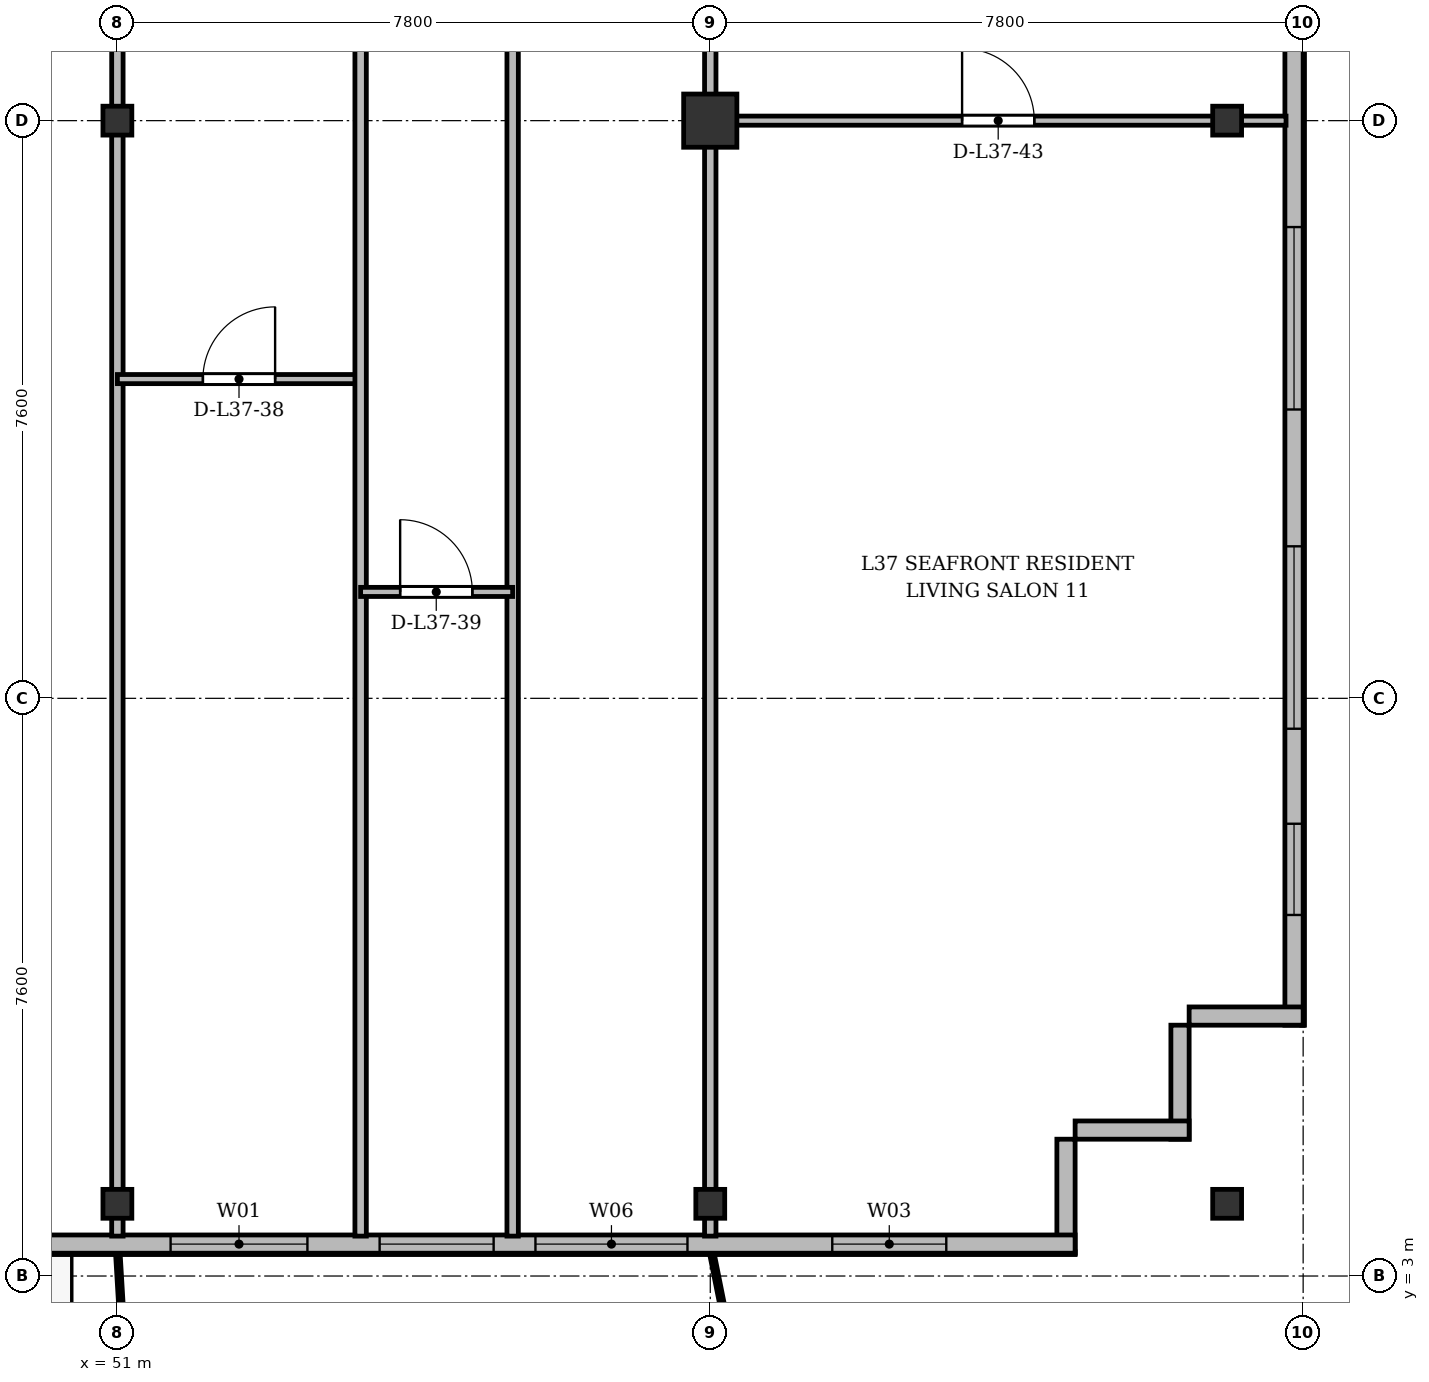
"""IFC4 building model, lengths in metres.
Left out: names, types, materials, properties, quantities, classifications, styles, units other than length and angle.
Written with IfcOpenShell. Run it as: python <this file> out.ifc"""

import sys

from ifc_helpers import new_model, si_unit, direction, frame, frame_2d, origin, origin_2d, place, context, subcontext, project, spatial, rectangle, i_section, extrude, source, transform, mapped, element, fill, save


model = new_model("IFC4")
c1 = context("Model", 3, precision=1e-05, world=origin(), true_north=direction((0.0, 1.0)))
c2 = subcontext(c1, "Body", "Model", "MODEL_VIEW")
j1 = project(units=[si_unit("LENGTHUNIT", "METRE"), si_unit("PLANEANGLEUNIT", "RADIAN")], contexts=[c1])
p1 = place(None, origin())
s1 = spatial("IfcSite", under=j1, at=p1, CompositionType="ELEMENT")
p2 = place(p1, origin())
s2 = spatial("IfcBuilding", under=s1, at=p2, CompositionType="ELEMENT")
p3 = place(p2, frame((0.0, 0.0, 142.9)))
s3 = spatial("IfcBuildingStorey", under=s2, at=p3, CompositionType="ELEMENT", Elevation=142.9)
m1 = source(origin(), c2, "Body", "SweptSolid", [
    extrude(i_section(OverallWidth=0.38, OverallDepth=0.38, WebThickness=0.02, FlangeThickness=0.03, at=origin_2d()), origin(), (0.0, 0.0, 1.0), 3.6),
])
for number, where, z_axis, x_axis in (
    (1, (51.0, 3.95, 0.0), (0.0, 0.0, 1.0), (1.0, 0.0, 0.0)),
    (2, (51.0, 18.2, 0.0), (0.0, 0.0, 1.0), (1.0, 0.0, 0.0)),
    (3, (58.8, 3.95, 0.0), (0.0, 0.0, 1.0), (1.0, 0.0, 0.0)),
):
    element("IfcColumn", number, at=place(p3, frame(where, z_axis=z_axis, x_axis=x_axis)), inside=s3, PredefinedType="COLUMN", context=c2, shape_type="MappedRepresentation", body=[
        mapped(m1, transform((0.0, 0.0, 0.0), x_axis=(1.0, 0.0, 0.0), y_axis=(0.0, 1.0, 0.0), z_axis=(0.0, 0.0, 1.0), scale=1.0)),
    ])
m2 = source(origin(), c2, "Body", "SweptSolid", [
    extrude(rectangle(XDim=0.7, YDim=0.7, at=origin_2d()), origin(), (0.0, 0.0, 1.0), 3.6),
])
p4 = place(p3, frame((58.8, 18.2, 0.0), z_axis=(0.0, 0.0, 1.0), x_axis=(1.0, 0.0, 0.0)))
e4 = element("IfcColumn", 4, at=p4, inside=s3, PredefinedType="COLUMN", context=c2, shape_type="MappedRepresentation", body=[
    mapped(m2, transform((0.0, 0.0, 0.0), x_axis=(1.0, 0.0, 0.0), y_axis=(0.0, 1.0, 0.0), z_axis=(0.0, 0.0, 1.0), scale=1.0)),
])
for number, where, z_axis, x_axis in (
    (5, (65.6, 3.95, 0.0), (0.0, 0.0, 1.0), (1.0, 0.0, 0.0)),
    (6, (65.6, 18.2, 0.0), (0.0, 0.0, 1.0), (1.0, 0.0, 0.0)),
):
    element("IfcColumn", number, at=place(p3, frame(where, z_axis=z_axis, x_axis=x_axis)), inside=s3, PredefinedType="COLUMN", context=c2, shape_type="MappedRepresentation", body=[
        mapped(m1, transform((0.0, 0.0, 0.0), x_axis=(1.0, 0.0, 0.0), y_axis=(0.0, 1.0, 0.0), z_axis=(0.0, 0.0, 1.0), scale=1.0)),
    ])
p5 = place(p3, frame((66.48, 45.5, 0.0), z_axis=(0.0, 0.0, 1.0), x_axis=(0.0, -1.0, 0.0)))
e7 = element("IfcWall", 7, at=p5, inside=s3, PredefinedType="SOLIDWALL", context=c2, shape_type="SweptSolid", body=[
    extrude(rectangle(XDim=39.2, YDim=0.24, at=frame_2d((19.6, 0.0))), origin(), (0.0, 0.0, 1.0), 3.35),
])
p6 = place(p5, frame((36.55, 0.0, 0.92)))
e8 = element("IfcOpeningElement", 8, at=p6, cuts=e7, PredefinedType="OPENING", context=c2, shape_type="SweptSolid", body=[
    extrude(rectangle(XDim=1.2, YDim=1.65, at=frame_2d((0.6, 0.825))), frame((0.0, 0.13, 0.0), z_axis=(0.0, -1.0, 0.0), x_axis=(1.0, 0.0, 0.0)), (0.0, 0.0, 1.0), 0.26),
])
p7 = place(p5, frame((32.9, 0.0, 0.92)))
e9 = element("IfcOpeningElement", 9, at=p7, cuts=e7, PredefinedType="OPENING", context=c2, shape_type="SweptSolid", body=[
    extrude(rectangle(XDim=2.4, YDim=2.1, at=frame_2d((1.2, 1.05))), frame((0.0, 0.13, 0.0), z_axis=(0.0, -1.0, 0.0), x_axis=(1.0, 0.0, 0.0)), (0.0, 0.0, 1.0), 0.26),
])
p8 = place(p5, frame((28.7, 0.0, 0.92)))
e10 = element("IfcOpeningElement", 10, at=p8, cuts=e7, PredefinedType="OPENING", context=c2, shape_type="SweptSolid", body=[
    extrude(rectangle(XDim=2.4, YDim=2.1, at=frame_2d((1.2, 1.05))), frame((0.0, 0.13, 0.0), z_axis=(0.0, -1.0, 0.0), x_axis=(1.0, 0.0, 0.0)), (0.0, 0.0, 1.0), 0.26),
])
p9 = place(p5, frame((21.5, 0.0, 0.92)))
e11 = element("IfcOpeningElement", 11, at=p9, cuts=e7, PredefinedType="OPENING", context=c2, shape_type="SweptSolid", body=[
    extrude(rectangle(XDim=2.4, YDim=2.1, at=frame_2d((1.2, 1.05))), frame((0.0, 0.13, 0.0), z_axis=(0.0, -1.0, 0.0), x_axis=(1.0, 0.0, 0.0)), (0.0, 0.0, 1.0), 0.26),
])
p10 = place(p5, frame((7.5, 0.0, 0.92)))
e12 = element("IfcOpeningElement", 12, at=p10, cuts=e7, PredefinedType="OPENING", context=c2, shape_type="SweptSolid", body=[
    extrude(rectangle(XDim=2.4, YDim=2.1, at=frame_2d((1.2, 1.05))), frame((0.0, 0.13, 0.0), z_axis=(0.0, -1.0, 0.0), x_axis=(1.0, 0.0, 0.0)), (0.0, 0.0, 1.0), 0.26),
])
p11 = place(p5, frame((4.5, 0.0, 0.92)))
e13 = element("IfcOpeningElement", 13, at=p11, cuts=e7, PredefinedType="OPENING", context=c2, shape_type="SweptSolid", body=[
    extrude(rectangle(XDim=1.2, YDim=1.65, at=frame_2d((0.6, 0.825))), frame((0.0, 0.13, 0.0), z_axis=(0.0, -1.0, 0.0), x_axis=(1.0, 0.0, 0.0)), (0.0, 0.0, 1.0), 0.26),
])
p12 = place(p5, frame((1.15, 0.0, 0.92)))
e14 = element("IfcOpeningElement", 14, at=p12, cuts=e7, PredefinedType="OPENING", context=c2, shape_type="SweptSolid", body=[
    extrude(rectangle(XDim=1.2, YDim=1.65, at=frame_2d((0.6, 0.825))), frame((0.0, 0.13, 0.0), z_axis=(0.0, -1.0, 0.0), x_axis=(1.0, 0.0, 0.0)), (0.0, 0.0, 1.0), 0.26),
])
p13 = place(p3, frame((66.6, 6.42, 0.0), z_axis=(0.0, 0.0, 1.0), x_axis=(-1.0, 0.0, 0.0)))
e15 = element("IfcWall", 15, at=p13, inside=s3, PredefinedType="SOLIDWALL", context=c2, shape_type="SweptSolid", body=[
    extrude(rectangle(XDim=1.5, YDim=0.24, at=frame_2d((0.75, 0.0))), origin(), (0.0, 0.0, 1.0), 2.85),
])
for number, where, z_axis, x_axis in (
    (16, (64.98, 6.3, 0.0), (0.0, 0.0, 1.0), (0.0, -1.0, 0.0)),
    (17, (65.1, 4.92, 0.0), (0.0, 0.0, 1.0), (-1.0, 0.0, 0.0)),
):
    element("IfcWall", number, at=place(p3, frame(where, z_axis=z_axis, x_axis=x_axis)), inside=s3, PredefinedType="SOLIDWALL", context=c2, shape_type="SweptSolid", body=[
        extrude(rectangle(XDim=1.5, YDim=0.24, at=frame_2d((0.75, 0.0))), origin(), (0.0, 0.0, 1.0), 3.35),
    ])
p14 = place(p3, frame((63.48, 4.8, 0.0), z_axis=(0.0, 0.0, 1.0), x_axis=(0.0, -1.0, 0.0)))
e18 = element("IfcWall", 18, at=p14, inside=s3, PredefinedType="SOLIDWALL", context=c2, shape_type="SweptSolid", body=[
    extrude(rectangle(XDim=1.5, YDim=0.24, at=frame_2d((0.75, 0.0))), origin(), (0.0, 0.0, 1.0), 2.75),
])
p15 = place(p3, frame((63.6, 3.42, 0.0), z_axis=(0.0, 0.0, 1.0), x_axis=(-1.0, 0.0, 0.0)))
e19 = element("IfcWall", 19, at=p15, inside=s3, PredefinedType="SOLIDWALL", context=c2, shape_type="SweptSolid", body=[
    extrude(rectangle(XDim=52.8, YDim=0.24, at=frame_2d((26.4, 0.0))), origin(), (0.0, 0.0, 1.0), 3.35),
])
p16 = place(p15, frame((1.695, 0.0, 0.9)))
e20 = element("IfcOpeningElement", 20, at=p16, cuts=e19, PredefinedType="OPENING", context=c2, shape_type="SweptSolid", body=[
    extrude(rectangle(XDim=1.5, YDim=1.75, at=frame_2d((0.75, 0.875))), frame((0.0, 0.13, 0.0), z_axis=(0.0, -1.0, 0.0), x_axis=(1.0, 0.0, 0.0)), (0.0, 0.0, 1.0), 0.26),
])
p17 = place(p15, frame((5.1, 0.0, 0.9)))
e21 = element("IfcOpeningElement", 21, at=p17, cuts=e19, PredefinedType="OPENING", context=c2, shape_type="SweptSolid", body=[
    extrude(rectangle(XDim=2.0, YDim=1.95, at=frame_2d((1.0, 0.975))), frame((0.0, 0.13, 0.0), z_axis=(0.0, -1.0, 0.0), x_axis=(1.0, 0.0, 0.0)), (0.0, 0.0, 1.0), 0.26),
])
p18 = place(p15, frame((7.65, 0.0, 0.9)))
e22 = element("IfcOpeningElement", 22, at=p18, cuts=e19, PredefinedType="OPENING", context=c2, shape_type="SweptSolid", body=[
    extrude(rectangle(XDim=1.5, YDim=1.75, at=frame_2d((0.75, 0.875))), frame((0.0, 0.13, 0.0), z_axis=(0.0, -1.0, 0.0), x_axis=(1.0, 0.0, 0.0)), (0.0, 0.0, 1.0), 0.26),
])
p19 = place(p15, frame((10.1, 0.0, 0.9)))
e23 = element("IfcOpeningElement", 23, at=p19, cuts=e19, PredefinedType="OPENING", context=c2, shape_type="SweptSolid", body=[
    extrude(rectangle(XDim=1.8, YDim=1.8, at=frame_2d((0.9, 0.9))), frame((0.0, 0.13, 0.0), z_axis=(0.0, -1.0, 0.0), x_axis=(1.0, 0.0, 0.0)), (0.0, 0.0, 1.0), 0.26),
])
p20 = place(p15, frame((14.417, 0.0, 0.0)))
e24 = element("IfcOpeningElement", 24, at=p20, cuts=e19, PredefinedType="OPENING", context=c2, shape_type="SweptSolid", body=[
    extrude(rectangle(XDim=1.2, YDim=2.2, at=frame_2d((0.6, 1.1))), frame((0.0, 0.13, 0.0), z_axis=(0.0, -1.0, 0.0), x_axis=(1.0, 0.0, 0.0)), (0.0, 0.0, 1.0), 0.26),
])
p21 = place(p15, frame((25.65, 0.0, 0.9)))
e25 = element("IfcOpeningElement", 25, at=p21, cuts=e19, PredefinedType="OPENING", context=c2, shape_type="SweptSolid", body=[
    extrude(rectangle(XDim=1.5, YDim=1.75, at=frame_2d((0.75, 0.875))), frame((0.0, 0.13, 0.0), z_axis=(0.0, -1.0, 0.0), x_axis=(1.0, 0.0, 0.0)), (0.0, 0.0, 1.0), 0.26),
])
p22 = place(p15, frame((35.6, 0.0, 0.9)))
e26 = element("IfcOpeningElement", 26, at=p22, cuts=e19, PredefinedType="OPENING", context=c2, shape_type="SweptSolid", body=[
    extrude(rectangle(XDim=2.0, YDim=1.95, at=frame_2d((1.0, 0.975))), frame((0.0, 0.13, 0.0), z_axis=(0.0, -1.0, 0.0), x_axis=(1.0, 0.0, 0.0)), (0.0, 0.0, 1.0), 0.26),
])
p23 = place(p15, frame((41.656, 0.0, 0.0)))
e27 = element("IfcOpeningElement", 27, at=p23, cuts=e19, PredefinedType="OPENING", context=c2, shape_type="SweptSolid", body=[
    extrude(rectangle(XDim=1.2, YDim=2.2, at=frame_2d((0.6, 1.1))), frame((0.0, 0.13, 0.0), z_axis=(0.0, -1.0, 0.0), x_axis=(1.0, 0.0, 0.0)), (0.0, 0.0, 1.0), 0.26),
])
p24 = place(p15, frame((43.65, 0.0, 0.9)))
e28 = element("IfcOpeningElement", 28, at=p24, cuts=e19, PredefinedType="OPENING", context=c2, shape_type="SweptSolid", body=[
    extrude(rectangle(XDim=1.5, YDim=1.75, at=frame_2d((0.75, 0.875))), frame((0.0, 0.13, 0.0), z_axis=(0.0, -1.0, 0.0), x_axis=(1.0, 0.0, 0.0)), (0.0, 0.0, 1.0), 0.26),
])
p25 = place(p15, frame((45.95, 0.0, 0.9)))
e29 = element("IfcOpeningElement", 29, at=p25, cuts=e19, PredefinedType="OPENING", context=c2, shape_type="SweptSolid", body=[
    extrude(rectangle(XDim=1.5, YDim=1.75, at=frame_2d((0.75, 0.875))), frame((0.0, 0.13, 0.0), z_axis=(0.0, -1.0, 0.0), x_axis=(1.0, 0.0, 0.0)), (0.0, 0.0, 1.0), 0.26),
])
p26 = place(p15, frame((49.605, 0.0, 0.9)))
e30 = element("IfcOpeningElement", 30, at=p26, cuts=e19, PredefinedType="OPENING", context=c2, shape_type="SweptSolid", body=[
    extrude(rectangle(XDim=1.5, YDim=1.75, at=frame_2d((0.75, 0.875))), frame((0.0, 0.13, 0.0), z_axis=(0.0, -1.0, 0.0), x_axis=(1.0, 0.0, 0.0)), (0.0, 0.0, 1.0), 0.26),
])
for number, where, z_axis, x_axis in (
    (31, (51.0, 3.525, 0.0), (0.0, 0.0, 1.0), (0.0, 1.0, 0.0)),
    (32, (58.8, 3.525, 0.0), (0.0, 0.0, 1.0), (0.0, 1.0, 0.0)),
):
    element("IfcWall", number, at=place(p3, frame(where, z_axis=z_axis, x_axis=x_axis)), inside=s3, PredefinedType="PARTITIONING", context=c2, shape_type="SweptSolid", body=[
        extrude(rectangle(XDim=27.275, YDim=0.15, at=frame_2d((13.638, 0.0))), origin(), (0.0, 0.0, 1.0), 2.85),
    ])
p27 = place(p3, frame((51.0, 14.8, 0.0), z_axis=(0.0, 0.0, 1.0), x_axis=(1.0, 0.0, 0.0)))
e33 = element("IfcWall", 33, at=p27, inside=s3, PredefinedType="PARTITIONING", context=c2, shape_type="SweptSolid", body=[
    extrude(rectangle(XDim=3.2, YDim=0.12, at=frame_2d((1.6, 0.0))), origin(), (0.0, 0.0, 1.0), 2.85),
])
p28 = place(p27, frame((1.125, 0.0, 0.0)))
e34 = element("IfcOpeningElement", 34, at=p28, cuts=e33, PredefinedType="OPENING", context=c2, shape_type="SweptSolid", body=[
    extrude(rectangle(XDim=0.95, YDim=2.15, at=frame_2d((0.475, 1.075))), frame((0.0, 0.07, 0.0), z_axis=(0.0, -1.0, 0.0), x_axis=(1.0, 0.0, 0.0)), (0.0, 0.0, 1.0), 0.14),
])
for number, where, z_axis, x_axis in (
    (35, (54.2, 3.525, 0.0), (0.0, 0.0, 1.0), (0.0, 1.0, 0.0)),
    (36, (56.2, 3.525, 0.0), (0.0, 0.0, 1.0), (0.0, 1.0, 0.0)),
):
    element("IfcWall", number, at=place(p3, frame(where, z_axis=z_axis, x_axis=x_axis)), inside=s3, PredefinedType="PARTITIONING", context=c2, shape_type="SweptSolid", body=[
        extrude(rectangle(XDim=27.275, YDim=0.15, at=frame_2d((13.638, 0.0))), origin(), (0.0, 0.0, 1.0), 2.75),
    ])
p29 = place(p3, frame((54.2, 12.0, 0.0), z_axis=(0.0, 0.0, 1.0), x_axis=(1.0, 0.0, 0.0)))
e37 = element("IfcWall", 37, at=p29, inside=s3, PredefinedType="PARTITIONING", context=c2, shape_type="SweptSolid", body=[
    extrude(rectangle(XDim=2.0, YDim=0.12, at=frame_2d((1.0, 0.0))), origin(), (0.0, 0.0, 1.0), 3.35),
])
p30 = place(p29, frame((0.52, 0.0, 0.0)))
e38 = element("IfcOpeningElement", 38, at=p30, cuts=e37, PredefinedType="OPENING", context=c2, shape_type="SweptSolid", body=[
    extrude(rectangle(XDim=0.95, YDim=2.15, at=frame_2d((0.475, 1.075))), frame((0.0, 0.07, 0.0), z_axis=(0.0, -1.0, 0.0), x_axis=(1.0, 0.0, 0.0)), (0.0, 0.0, 1.0), 0.14),
])
p31 = place(p3, frame((58.8, 18.2, 0.0), z_axis=(0.0, 0.0, 1.0), x_axis=(1.0, 0.0, 0.0)))
e39 = element("IfcWall", 39, at=p31, inside=s3, PredefinedType="PARTITIONING", context=c2, shape_type="SweptSolid", body=[
    extrude(rectangle(XDim=7.575, YDim=0.12, at=frame_2d((3.788, 0.0))), origin(), (0.0, 0.0, 1.0), 2.75),
])
p32 = place(p31, frame((3.313, 0.0, 0.0)))
e40 = element("IfcOpeningElement", 40, at=p32, cuts=e39, PredefinedType="OPENING", context=c2, shape_type="SweptSolid", body=[
    extrude(rectangle(XDim=0.95, YDim=2.15, at=frame_2d((0.475, 1.075))), frame((0.0, 0.07, 0.0), z_axis=(0.0, -1.0, 0.0), x_axis=(1.0, 0.0, 0.0)), (0.0, 0.0, 1.0), 0.14),
])
m3 = source(origin(), c2, "Body", "SweptSolid", [
    extrude(rectangle(XDim=1.2, YDim=1.65, at=frame_2d((0.6, 0.825))), frame((0.0, 0.03, 0.0), z_axis=(0.0, -1.0, 0.0), x_axis=(1.0, 0.0, 0.0)), (0.0, 0.0, 1.0), 0.06),
])
p33 = place(p6, origin())
e41 = element("IfcWindow", 41, at=p33, inside=s3, PartitioningType="SINGLE_PANEL", PredefinedType="WINDOW", context=c2, shape_type="MappedRepresentation", body=[
    mapped(m3, transform((0.0, 0.0, 0.0), x_axis=(1.0, 0.0, 0.0), y_axis=(0.0, 1.0, 0.0), z_axis=(0.0, 0.0, 1.0), scale=1.0)),
])
fill(e8, e41)
m4 = source(origin(), c2, "Body", "SweptSolid", [
    extrude(rectangle(XDim=2.4, YDim=2.1, at=frame_2d((1.2, 1.05))), frame((0.0, 0.03, 0.0), z_axis=(0.0, -1.0, 0.0), x_axis=(1.0, 0.0, 0.0)), (0.0, 0.0, 1.0), 0.06),
])
p34 = place(p7, origin())
e42 = element("IfcWindow", 42, at=p34, inside=s3, PartitioningType="SINGLE_PANEL", PredefinedType="WINDOW", context=c2, shape_type="MappedRepresentation", body=[
    mapped(m4, transform((0.0, 0.0, 0.0), x_axis=(1.0, 0.0, 0.0), y_axis=(0.0, 1.0, 0.0), z_axis=(0.0, 0.0, 1.0), scale=1.0)),
])
fill(e9, e42)
p35 = place(p8, origin())
e43 = element("IfcWindow", 43, at=p35, inside=s3, PartitioningType="SINGLE_PANEL", PredefinedType="WINDOW", context=c2, shape_type="MappedRepresentation", body=[
    mapped(m4, transform((0.0, 0.0, 0.0), x_axis=(1.0, 0.0, 0.0), y_axis=(0.0, 1.0, 0.0), z_axis=(0.0, 0.0, 1.0), scale=1.0)),
])
fill(e10, e43)
m5 = source(origin(), c2, "Body", "SweptSolid", [
    extrude(rectangle(XDim=1.5, YDim=1.75, at=frame_2d((0.75, 0.875))), frame((0.0, 0.03, 0.0), z_axis=(0.0, -1.0, 0.0), x_axis=(1.0, 0.0, 0.0)), (0.0, 0.0, 1.0), 0.06),
])
p36 = place(p16, origin())
e44 = element("IfcWindow", 44, at=p36, inside=s3, PartitioningType="SINGLE_PANEL", PredefinedType="WINDOW", context=c2, shape_type="MappedRepresentation", body=[
    mapped(m5, transform((0.0, 0.0, 0.0), x_axis=(1.0, 0.0, 0.0), y_axis=(0.0, 1.0, 0.0), z_axis=(0.0, 0.0, 1.0), scale=1.0)),
])
fill(e20, e44)
m6 = source(origin(), c2, "Body", "SweptSolid", [
    extrude(rectangle(XDim=2.0, YDim=1.95, at=frame_2d((1.0, 0.975))), frame((0.0, 0.03, 0.0), z_axis=(0.0, -1.0, 0.0), x_axis=(1.0, 0.0, 0.0)), (0.0, 0.0, 1.0), 0.06),
])
p37 = place(p17, origin())
e45 = element("IfcWindow", 45, at=p37, inside=s3, PartitioningType="SINGLE_PANEL", PredefinedType="WINDOW", context=c2, shape_type="MappedRepresentation", body=[
    mapped(m6, transform((0.0, 0.0, 0.0), x_axis=(1.0, 0.0, 0.0), y_axis=(0.0, 1.0, 0.0), z_axis=(0.0, 0.0, 1.0), scale=1.0)),
])
fill(e21, e45)
p38 = place(p18, origin())
e46 = element("IfcWindow", 46, at=p38, inside=s3, PartitioningType="SINGLE_PANEL", PredefinedType="WINDOW", context=c2, shape_type="MappedRepresentation", body=[
    mapped(m5, transform((0.0, 0.0, 0.0), x_axis=(1.0, 0.0, 0.0), y_axis=(0.0, 1.0, 0.0), z_axis=(0.0, 0.0, 1.0), scale=1.0)),
])
fill(e22, e46)
m7 = source(origin(), c2, "Body", "SweptSolid", [
    extrude(rectangle(XDim=1.8, YDim=1.8, at=frame_2d((0.9, 0.9))), frame((0.0, 0.03, 0.0), z_axis=(0.0, -1.0, 0.0), x_axis=(1.0, 0.0, 0.0)), (0.0, 0.0, 1.0), 0.06),
])
p39 = place(p19, origin())
e47 = element("IfcWindow", 47, at=p39, inside=s3, PartitioningType="SINGLE_PANEL", PredefinedType="WINDOW", context=c2, shape_type="MappedRepresentation", body=[
    mapped(m7, transform((0.0, 0.0, 0.0), x_axis=(1.0, 0.0, 0.0), y_axis=(0.0, 1.0, 0.0), z_axis=(0.0, 0.0, 1.0), scale=1.0)),
])
fill(e23, e47)
m8 = source(origin(), c2, "Body", "SweptSolid", [
    extrude(rectangle(XDim=0.95, YDim=2.15, at=frame_2d((0.475, 1.075))), frame((0.0, 0.025, 0.0), z_axis=(0.0, -1.0, 0.0), x_axis=(1.0, 0.0, 0.0)), (0.0, 0.0, 1.0), 0.05),
])
p40 = place(p28, origin())
e48 = element("IfcDoor", 48, at=p40, inside=s3, OperationType="SINGLE_SWING_RIGHT", PredefinedType="DOOR", context=c2, shape_type="MappedRepresentation", body=[
    mapped(m8, transform((0.0, 0.0, 0.0), x_axis=(1.0, 0.0, 0.0), y_axis=(0.0, 1.0, 0.0), z_axis=(0.0, 0.0, 1.0), scale=1.0)),
])
fill(e34, e48)
p41 = place(p30, origin())
e49 = element("IfcDoor", 49, at=p41, inside=s3, OperationType="SINGLE_SWING_LEFT", PredefinedType="DOOR", context=c2, shape_type="MappedRepresentation", body=[
    mapped(m8, transform((0.0, 0.0, 0.0), x_axis=(1.0, 0.0, 0.0), y_axis=(0.0, 1.0, 0.0), z_axis=(0.0, 0.0, 1.0), scale=1.0)),
])
fill(e38, e49)
p42 = place(p32, origin())
e50 = element("IfcDoor", 50, at=p42, inside=s3, OperationType="SINGLE_SWING_LEFT", PredefinedType="DOOR", context=c2, shape_type="MappedRepresentation", body=[
    mapped(m8, transform((0.0, 0.0, 0.0), x_axis=(1.0, 0.0, 0.0), y_axis=(0.0, 1.0, 0.0), z_axis=(0.0, 0.0, 1.0), scale=1.0)),
])
fill(e40, e50)
save(model, sys.argv[1])
